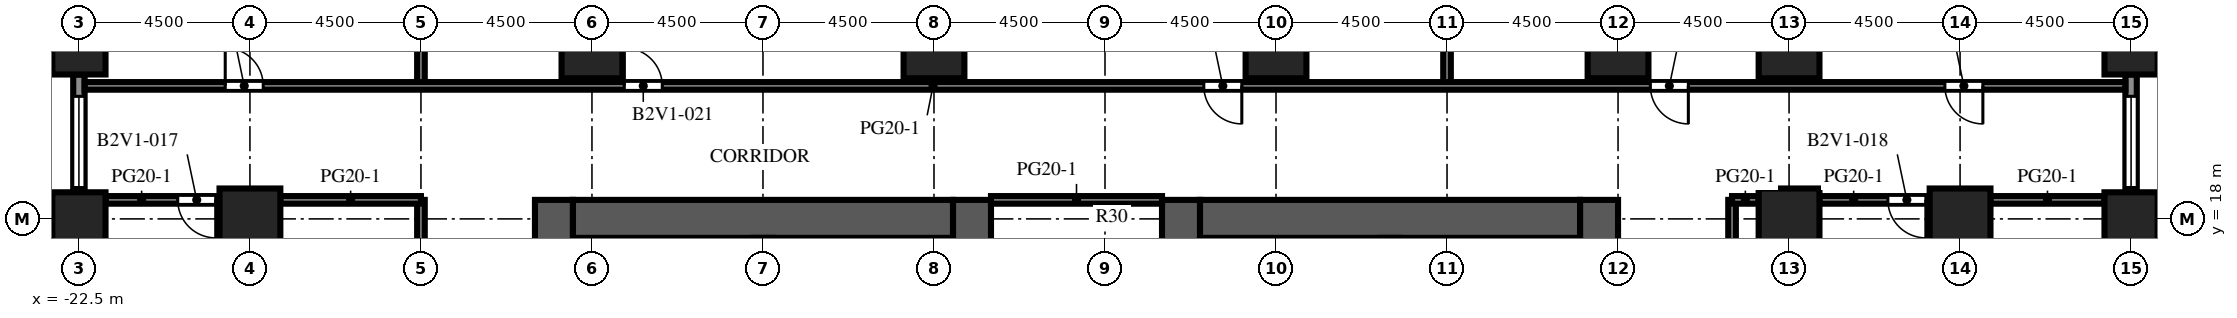
"""IFC4 building model, lengths in metres.
Left out: names, types, materials, properties, quantities, classifications, styles, units other than length and angle.
Written with IfcOpenShell. Run it as: python <this file> out.ifc"""

import sys

from ifc_helpers import new_model, si_unit, direction, frame, frame_2d, origin, origin_2d, place, context, subcontext, project, spatial, rectangle, extrude, element, fill, save


model = new_model("IFC4")
c1 = context("Model", 3, precision=1e-05, world=origin(), true_north=direction((0.0, 1.0)))
c2 = subcontext(c1, "Body", "Model", "MODEL_VIEW")
j1 = project(units=[si_unit("LENGTHUNIT", "METRE"), si_unit("PLANEANGLEUNIT", "RADIAN")], contexts=[c1])
p1 = place(None, origin())
s1 = spatial("IfcSite", under=j1, at=p1, CompositionType="ELEMENT")
p2 = place(p1, origin())
s2 = spatial("IfcBuilding", under=s1, at=p2, CompositionType="ELEMENT")
p3 = place(p2, frame((0.0, 0.0, 50.1)))
s3 = spatial("IfcBuildingStorey", under=s2, at=p3, CompositionType="ELEMENT", Elevation=50.1)
for number, where, z_axis, x_axis in (
    (1, (-22.5, 18.0, 0.0), (0.0, 0.0, 1.0), (1.0, 0.0, 0.0)),
    (2, (-22.5, 22.5, 0.0), (0.0, 0.0, 1.0), (1.0, 0.0, 0.0)),
    (3, (31.5, 18.0, 0.0), (0.0, 0.0, 1.0), (1.0, 0.0, 0.0)),
    (4, (31.5, 22.5, 0.0), (0.0, 0.0, 1.0), (1.0, 0.0, 0.0)),
):
    element("IfcColumn", number, at=place(p3, frame(where, z_axis=z_axis, x_axis=x_axis)), inside=s3, PredefinedType="COLUMN", context=c2, shape_type="SweptSolid", body=[
        extrude(rectangle(XDim=1.4, YDim=1.4, at=origin_2d()), origin(), (0.0, 0.0, 1.0), 4.1),
    ])
for number, where, z_axis, x_axis in (
    (5, (-18.0, 18.0, 0.0), (0.0, 0.0, 1.0), (1.0, 0.0, 0.0)),
    (6, (-9.0, 22.5, 0.0), (0.0, 0.0, 1.0), (1.0, 0.0, 0.0)),
    (7, (0.0, 22.5, 0.0), (0.0, 0.0, 1.0), (1.0, 0.0, 0.0)),
    (8, (9.0, 22.5, 0.0), (0.0, 0.0, 1.0), (1.0, 0.0, 0.0)),
    (9, (18.0, 22.5, 0.0), (0.0, 0.0, 1.0), (1.0, 0.0, 0.0)),
    (10, (22.5, 18.0, 0.0), (0.0, 0.0, 1.0), (1.0, 0.0, 0.0)),
    (11, (22.5, 22.5, 0.0), (0.0, 0.0, 1.0), (1.0, 0.0, 0.0)),
    (12, (27.0, 18.0, 0.0), (0.0, 0.0, 1.0), (1.0, 0.0, 0.0)),
):
    element("IfcColumn", number, at=place(p3, frame(where, z_axis=z_axis, x_axis=x_axis)), inside=s3, PredefinedType="COLUMN", context=c2, shape_type="SweptSolid", body=[
        extrude(rectangle(XDim=1.6, YDim=1.6, at=origin_2d()), origin(), (0.0, 0.0, 1.0), 4.1),
    ])
p4 = place(p3, frame((-10.0, -9.0, 0.0), z_axis=(0.0, 0.0, 1.0), x_axis=(0.0, 1.0, 0.0)))
e13 = element("IfcWall", 13, at=p4, inside=s3, PredefinedType="SHEAR", context=c2, shape_type="SweptSolid", body=[
    extrude(rectangle(XDim=27.5, YDim=1.0, at=frame_2d((13.75, 0.0))), origin(), (0.0, 0.0, 1.0), 4.1),
])
p5 = place(p4, frame((12.55, 0.0, 0.0)))
e14 = element("IfcOpeningElement", 14, at=p5, cuts=e13, PredefinedType="OPENING", context=c2, shape_type="SweptSolid", body=[
    extrude(rectangle(XDim=2.4, YDim=2.4, at=frame_2d((1.2, 1.2))), frame((0.0, 0.51, 0.0), z_axis=(0.0, -1.0, 0.0), x_axis=(1.0, 0.0, 0.0)), (0.0, 0.0, 1.0), 1.02),
])
p6 = place(p4, frame((6.825, 0.0, 0.0)))
e15 = element("IfcOpeningElement", 15, at=p6, cuts=e13, PredefinedType="OPENING", context=c2, shape_type="SweptSolid", body=[
    extrude(rectangle(XDim=1.2, YDim=2.1, at=frame_2d((0.6, 1.05))), frame((0.0, 0.51, 0.0), z_axis=(0.0, -1.0, 0.0), x_axis=(1.0, 0.0, 0.0)), (0.0, 0.0, 1.0), 1.02),
])
p7 = place(p4, frame((19.475, 0.0, 0.0)))
e16 = element("IfcOpeningElement", 16, at=p7, cuts=e13, PredefinedType="OPENING", context=c2, shape_type="SweptSolid", body=[
    extrude(rectangle(XDim=1.2, YDim=2.1, at=frame_2d((0.6, 1.05))), frame((0.0, 0.51, 0.0), z_axis=(0.0, -1.0, 0.0), x_axis=(1.0, 0.0, 0.0)), (0.0, 0.0, 1.0), 1.02),
])
p8 = place(p3, frame((1.0, -9.0, 0.0), z_axis=(0.0, 0.0, 1.0), x_axis=(0.0, 1.0, 0.0)))
e17 = element("IfcWall", 17, at=p8, inside=s3, PredefinedType="SHEAR", context=c2, shape_type="SweptSolid", body=[
    extrude(rectangle(XDim=27.5, YDim=1.0, at=frame_2d((13.75, 0.0))), origin(), (0.0, 0.0, 1.0), 4.1),
])
p9 = place(p8, frame((12.55, 0.0, 0.0)))
e18 = element("IfcOpeningElement", 18, at=p9, cuts=e17, PredefinedType="OPENING", context=c2, shape_type="SweptSolid", body=[
    extrude(rectangle(XDim=2.4, YDim=2.4, at=frame_2d((1.2, 1.2))), frame((0.0, 0.51, 0.0), z_axis=(0.0, -1.0, 0.0), x_axis=(1.0, 0.0, 0.0)), (0.0, 0.0, 1.0), 1.02),
])
p10 = place(p8, frame((4.025, 0.0, 0.0)))
e19 = element("IfcOpeningElement", 19, at=p10, cuts=e17, PredefinedType="OPENING", context=c2, shape_type="SweptSolid", body=[
    extrude(rectangle(XDim=1.2, YDim=2.1, at=frame_2d((0.6, 1.05))), frame((0.0, 0.51, 0.0), z_axis=(0.0, -1.0, 0.0), x_axis=(1.0, 0.0, 0.0)), (0.0, 0.0, 1.0), 1.02),
])
p11 = place(p8, frame((22.275, 0.0, 0.0)))
e20 = element("IfcOpeningElement", 20, at=p11, cuts=e17, PredefinedType="OPENING", context=c2, shape_type="SweptSolid", body=[
    extrude(rectangle(XDim=1.2, YDim=2.1, at=frame_2d((0.6, 1.05))), frame((0.0, 0.51, 0.0), z_axis=(0.0, -1.0, 0.0), x_axis=(1.0, 0.0, 0.0)), (0.0, 0.0, 1.0), 1.02),
])
p12 = place(p3, frame((-9.5, 18.0, 0.0), z_axis=(0.0, 0.0, 1.0), x_axis=(1.0, 0.0, 0.0)))
e21 = element("IfcWall", 21, at=p12, inside=s3, PredefinedType="SHEAR", context=c2, shape_type="SweptSolid", body=[
    extrude(rectangle(XDim=10.0, YDim=1.0, at=frame_2d((5.0, 0.0))), origin(), (0.0, 0.0, 1.0), 4.1),
])
p13 = place(p3, frame((6.5, -9.0, 0.0), z_axis=(0.0, 0.0, 1.0), x_axis=(0.0, 1.0, 0.0)))
e22 = element("IfcWall", 22, at=p13, inside=s3, PredefinedType="SHEAR", context=c2, shape_type="SweptSolid", body=[
    extrude(rectangle(XDim=27.5, YDim=1.0, at=frame_2d((13.75, 0.0))), origin(), (0.0, 0.0, 1.0), 4.1),
])
p14 = place(p13, frame((12.55, 0.0, 0.0)))
e23 = element("IfcOpeningElement", 23, at=p14, cuts=e22, PredefinedType="OPENING", context=c2, shape_type="SweptSolid", body=[
    extrude(rectangle(XDim=2.4, YDim=2.4, at=frame_2d((1.2, 1.2))), frame((0.0, 0.51, 0.0), z_axis=(0.0, -1.0, 0.0), x_axis=(1.0, 0.0, 0.0)), (0.0, 0.0, 1.0), 1.02),
])
p15 = place(p13, frame((4.025, 0.0, 0.0)))
e24 = element("IfcOpeningElement", 24, at=p15, cuts=e22, PredefinedType="OPENING", context=c2, shape_type="SweptSolid", body=[
    extrude(rectangle(XDim=1.2, YDim=2.1, at=frame_2d((0.6, 1.05))), frame((0.0, 0.51, 0.0), z_axis=(0.0, -1.0, 0.0), x_axis=(1.0, 0.0, 0.0)), (0.0, 0.0, 1.0), 1.02),
])
p16 = place(p13, frame((22.275, 0.0, 0.0)))
e25 = element("IfcOpeningElement", 25, at=p16, cuts=e22, PredefinedType="OPENING", context=c2, shape_type="SweptSolid", body=[
    extrude(rectangle(XDim=1.2, YDim=2.1, at=frame_2d((0.6, 1.05))), frame((0.0, 0.51, 0.0), z_axis=(0.0, -1.0, 0.0), x_axis=(1.0, 0.0, 0.0)), (0.0, 0.0, 1.0), 1.02),
])
p17 = place(p3, frame((17.5, -9.0, 0.0), z_axis=(0.0, 0.0, 1.0), x_axis=(0.0, 1.0, 0.0)))
e26 = element("IfcWall", 26, at=p17, inside=s3, PredefinedType="SHEAR", context=c2, shape_type="SweptSolid", body=[
    extrude(rectangle(XDim=27.5, YDim=1.0, at=frame_2d((13.75, 0.0))), origin(), (0.0, 0.0, 1.0), 4.1),
])
p18 = place(p17, frame((12.55, 0.0, 0.0)))
e27 = element("IfcOpeningElement", 27, at=p18, cuts=e26, PredefinedType="OPENING", context=c2, shape_type="SweptSolid", body=[
    extrude(rectangle(XDim=2.4, YDim=2.4, at=frame_2d((1.2, 1.2))), frame((0.0, 0.51, 0.0), z_axis=(0.0, -1.0, 0.0), x_axis=(1.0, 0.0, 0.0)), (0.0, 0.0, 1.0), 1.02),
])
p19 = place(p17, frame((6.825, 0.0, 0.0)))
e28 = element("IfcOpeningElement", 28, at=p19, cuts=e26, PredefinedType="OPENING", context=c2, shape_type="SweptSolid", body=[
    extrude(rectangle(XDim=1.2, YDim=2.1, at=frame_2d((0.6, 1.05))), frame((0.0, 0.51, 0.0), z_axis=(0.0, -1.0, 0.0), x_axis=(1.0, 0.0, 0.0)), (0.0, 0.0, 1.0), 1.02),
])
p20 = place(p17, frame((19.475, 0.0, 0.0)))
e29 = element("IfcOpeningElement", 29, at=p20, cuts=e26, PredefinedType="OPENING", context=c2, shape_type="SweptSolid", body=[
    extrude(rectangle(XDim=1.2, YDim=2.1, at=frame_2d((0.6, 1.05))), frame((0.0, 0.51, 0.0), z_axis=(0.0, -1.0, 0.0), x_axis=(1.0, 0.0, 0.0)), (0.0, 0.0, 1.0), 1.02),
])
p21 = place(p3, frame((7.0, 18.0, 0.0), z_axis=(0.0, 0.0, 1.0), x_axis=(1.0, 0.0, 0.0)))
e30 = element("IfcWall", 30, at=p21, inside=s3, PredefinedType="SHEAR", context=c2, shape_type="SweptSolid", body=[
    extrude(rectangle(XDim=10.0, YDim=1.0, at=frame_2d((5.0, 0.0))), origin(), (0.0, 0.0, 1.0), 4.1),
])
p22 = place(p3, frame((31.5, 21.8, 0.0), z_axis=(0.0, 0.0, 1.0), x_axis=(0.0, -1.0, 0.0)))
e31 = element("IfcWall", 31, at=p22, inside=s3, PredefinedType="SOLIDWALL", context=c2, shape_type="SweptSolid", body=[
    extrude(rectangle(XDim=3.1, YDim=0.3, at=frame_2d((1.55, 0.0))), origin(), (0.0, 0.0, 1.0), 2.75),
])
p23 = place(p22, frame((0.575, 0.0, 0.8)))
e32 = element("IfcOpeningElement", 32, at=p23, cuts=e31, PredefinedType="OPENING", context=c2, shape_type="SweptSolid", body=[
    extrude(rectangle(XDim=2.4, YDim=1.7, at=frame_2d((1.2, 0.85))), frame((0.0, 0.16, 0.0), z_axis=(0.0, -1.0, 0.0), x_axis=(1.0, 0.0, 0.0)), (0.0, 0.0, 1.0), 0.32),
])
p24 = place(p3, frame((-22.5, 18.7, 0.0), z_axis=(0.0, 0.0, 1.0), x_axis=(0.0, 1.0, 0.0)))
e33 = element("IfcWall", 33, at=p24, inside=s3, PredefinedType="SOLIDWALL", context=c2, shape_type="SweptSolid", body=[
    extrude(rectangle(XDim=3.1, YDim=0.3, at=frame_2d((1.55, 0.0))), origin(), (0.0, 0.0, 1.0), 2.75),
])
p25 = place(p24, frame((0.125, 0.0, 0.8)))
e34 = element("IfcOpeningElement", 34, at=p25, cuts=e33, PredefinedType="OPENING", context=c2, shape_type="SweptSolid", body=[
    extrude(rectangle(XDim=2.4, YDim=1.7, at=frame_2d((1.2, 0.85))), frame((0.0, 0.16, 0.0), z_axis=(0.0, -1.0, 0.0), x_axis=(1.0, 0.0, 0.0)), (0.0, 0.0, 1.0), 0.32),
])
p26 = place(p3, frame((-13.5, -9.0, 0.0), z_axis=(0.0, 0.0, 1.0), x_axis=(0.0, 1.0, 0.0)))
e35 = element("IfcWall", 35, at=p26, inside=s3, PredefinedType="PARTITIONING", context=c2, shape_type="SweptSolid", body=[
    extrude(rectangle(XDim=27.5, YDim=0.2, at=frame_2d((13.75, 0.0))), origin(), (0.0, 0.0, 1.0), 3.65),
])
p27 = place(p26, frame((5.1, 0.0, 0.0)))
e36 = element("IfcOpeningElement", 36, at=p27, cuts=e35, PredefinedType="OPENING", context=c2, shape_type="SweptSolid", body=[
    extrude(rectangle(XDim=1.0, YDim=2.1, at=frame_2d((0.5, 1.05))), frame((0.0, 0.11, 0.0), z_axis=(0.0, -1.0, 0.0), x_axis=(1.0, 0.0, 0.0)), (0.0, 0.0, 1.0), 0.22),
])
p28 = place(p26, frame((15.6, 0.0, 0.0)))
e37 = element("IfcOpeningElement", 37, at=p28, cuts=e35, PredefinedType="OPENING", context=c2, shape_type="SweptSolid", body=[
    extrude(rectangle(XDim=1.0, YDim=2.1, at=frame_2d((0.5, 1.05))), frame((0.0, 0.11, 0.0), z_axis=(0.0, -1.0, 0.0), x_axis=(1.0, 0.0, 0.0)), (0.0, 0.0, 1.0), 0.22),
])
for number, where, z_axis, x_axis in (
    (38, (-13.5, 21.5, 0.0), (0.0, 0.0, 1.0), (0.0, 1.0, 0.0)),
    (39, (13.5, 21.5, 0.0), (0.0, 0.0, 1.0), (0.0, 1.0, 0.0)),
):
    element("IfcWall", number, at=place(p3, frame(where, z_axis=z_axis, x_axis=x_axis)), inside=s3, PredefinedType="PARTITIONING", context=c2, shape_type="SweptSolid", body=[
        extrude(rectangle(XDim=4.8, YDim=0.2, at=frame_2d((2.4, 0.0))), origin(), (0.0, 0.0, 1.0), 3.65),
    ])
p29 = place(p3, frame((21.0, 18.5, 0.0), z_axis=(0.0, 0.0, 1.0), x_axis=(0.0, -1.0, 0.0)))
e40 = element("IfcWall", 40, at=p29, inside=s3, PredefinedType="PARTITIONING", context=c2, shape_type="SweptSolid", body=[
    extrude(rectangle(XDim=27.5, YDim=0.2, at=frame_2d((13.75, 0.0))), origin(), (0.0, 0.0, 1.0), 3.65),
])
p30 = place(p29, frame((10.9, 0.0, 0.0)))
e41 = element("IfcOpeningElement", 41, at=p30, cuts=e40, PredefinedType="OPENING", context=c2, shape_type="SweptSolid", body=[
    extrude(rectangle(XDim=1.0, YDim=2.1, at=frame_2d((0.5, 1.05))), frame((0.0, 0.11, 0.0), z_axis=(0.0, -1.0, 0.0), x_axis=(1.0, 0.0, 0.0)), (0.0, 0.0, 1.0), 0.22),
])
p31 = place(p3, frame((-18.8, 18.5, 0.0), z_axis=(0.0, 0.0, 1.0), x_axis=(-1.0, 0.0, 0.0)))
e42 = element("IfcWall", 42, at=p31, inside=s3, PredefinedType="PARTITIONING", context=c2, shape_type="SweptSolid", body=[
    extrude(rectangle(XDim=3.0, YDim=0.2, at=frame_2d((1.5, 0.0))), origin(), (0.0, 0.0, 1.0), 3.65),
])
p32 = place(p31, frame((0.1, 0.0, 0.0)))
e43 = element("IfcOpeningElement", 43, at=p32, cuts=e42, PredefinedType="OPENING", context=c2, shape_type="SweptSolid", body=[
    extrude(rectangle(XDim=1.0, YDim=2.1, at=frame_2d((0.5, 1.05))), frame((0.0, 0.11, 0.0), z_axis=(0.0, -1.0, 0.0), x_axis=(1.0, 0.0, 0.0)), (0.0, 0.0, 1.0), 0.22),
])
p33 = place(p3, frame((-17.2, 18.5, 0.0), z_axis=(0.0, 0.0, 1.0), x_axis=(1.0, 0.0, 0.0)))
e44 = element("IfcWall", 44, at=p33, inside=s3, PredefinedType="PARTITIONING", context=c2, shape_type="SweptSolid", body=[
    extrude(rectangle(XDim=3.7, YDim=0.2, at=frame_2d((1.85, 0.0))), origin(), (0.0, 0.0, 1.0), 3.65),
])
p34 = place(p3, frame((1.5, 18.5, 0.0), z_axis=(0.0, 0.0, 1.0), x_axis=(1.0, 0.0, 0.0)))
e45 = element("IfcWall", 45, at=p34, inside=s3, PredefinedType="PARTITIONING", context=c2, shape_type="SweptSolid", body=[
    extrude(rectangle(XDim=4.5, YDim=0.2, at=frame_2d((2.25, 0.0))), origin(), (0.0, 0.0, 1.0), 3.65),
])
p35 = place(p3, frame((21.0, 18.5, 0.0), z_axis=(0.0, 0.0, 1.0), x_axis=(1.0, 0.0, 0.0)))
e46 = element("IfcWall", 46, at=p35, inside=s3, PredefinedType="PARTITIONING", context=c2, shape_type="SweptSolid", body=[
    extrude(rectangle(XDim=0.7, YDim=0.2, at=frame_2d((0.35, 0.0))), origin(), (0.0, 0.0, 1.0), 3.65),
])
p36 = place(p3, frame((26.2, 18.5, 0.0), z_axis=(0.0, 0.0, 1.0), x_axis=(-1.0, 0.0, 0.0)))
e47 = element("IfcWall", 47, at=p36, inside=s3, PredefinedType="PARTITIONING", context=c2, shape_type="SweptSolid", body=[
    extrude(rectangle(XDim=2.9, YDim=0.2, at=frame_2d((1.45, 0.0))), origin(), (0.0, 0.0, 1.0), 3.65),
])
p37 = place(p36, frame((0.1, 0.0, 0.0)))
e48 = element("IfcOpeningElement", 48, at=p37, cuts=e47, PredefinedType="OPENING", context=c2, shape_type="SweptSolid", body=[
    extrude(rectangle(XDim=1.0, YDim=2.1, at=frame_2d((0.5, 1.05))), frame((0.0, 0.11, 0.0), z_axis=(0.0, -1.0, 0.0), x_axis=(1.0, 0.0, 0.0)), (0.0, 0.0, 1.0), 0.22),
])
p38 = place(p3, frame((27.8, 18.5, 0.0), z_axis=(0.0, 0.0, 1.0), x_axis=(1.0, 0.0, 0.0)))
e49 = element("IfcWall", 49, at=p38, inside=s3, PredefinedType="PARTITIONING", context=c2, shape_type="SweptSolid", body=[
    extrude(rectangle(XDim=3.0, YDim=0.2, at=frame_2d((1.5, 0.0))), origin(), (0.0, 0.0, 1.0), 3.65),
])
p39 = place(p3, frame((-22.35, 21.5, 0.0), z_axis=(0.0, 0.0, 1.0), x_axis=(1.0, 0.0, 0.0)))
e50 = element("IfcWall", 50, at=p39, inside=s3, PredefinedType="PARTITIONING", context=c2, shape_type="SweptSolid", body=[
    extrude(rectangle(XDim=53.7, YDim=0.2, at=frame_2d((26.85, 0.0))), origin(), (0.0, 0.0, 1.0), 3.65),
])
p40 = place(p39, frame((3.7, 0.0, 0.0)))
e51 = element("IfcOpeningElement", 51, at=p40, cuts=e50, PredefinedType="OPENING", context=c2, shape_type="SweptSolid", body=[
    extrude(rectangle(XDim=1.0, YDim=2.1, at=frame_2d((0.5, 1.05))), frame((0.0, 0.11, 0.0), z_axis=(0.0, -1.0, 0.0), x_axis=(1.0, 0.0, 0.0)), (0.0, 0.0, 1.0), 0.22),
])
p41 = place(p39, frame((14.2, 0.0, 0.0)))
e52 = element("IfcOpeningElement", 52, at=p41, cuts=e50, PredefinedType="OPENING", context=c2, shape_type="SweptSolid", body=[
    extrude(rectangle(XDim=1.0, YDim=2.1, at=frame_2d((0.5, 1.05))), frame((0.0, 0.11, 0.0), z_axis=(0.0, -1.0, 0.0), x_axis=(1.0, 0.0, 0.0)), (0.0, 0.0, 1.0), 0.22),
])
p42 = place(p39, frame((29.45, 0.0, 0.0)))
e53 = element("IfcOpeningElement", 53, at=p42, cuts=e50, PredefinedType="OPENING", context=c2, shape_type="SweptSolid", body=[
    extrude(rectangle(XDim=1.0, YDim=2.1, at=frame_2d((0.5, 1.05))), frame((0.0, 0.11, 0.0), z_axis=(0.0, -1.0, 0.0), x_axis=(1.0, 0.0, 0.0)), (0.0, 0.0, 1.0), 0.22),
])
p43 = place(p39, frame((41.2, 0.0, 0.0)))
e54 = element("IfcOpeningElement", 54, at=p43, cuts=e50, PredefinedType="OPENING", context=c2, shape_type="SweptSolid", body=[
    extrude(rectangle(XDim=1.0, YDim=2.1, at=frame_2d((0.5, 1.05))), frame((0.0, 0.11, 0.0), z_axis=(0.0, -1.0, 0.0), x_axis=(1.0, 0.0, 0.0)), (0.0, 0.0, 1.0), 0.22),
])
p44 = place(p39, frame((48.95, 0.0, 0.0)))
e55 = element("IfcOpeningElement", 55, at=p44, cuts=e50, PredefinedType="OPENING", context=c2, shape_type="SweptSolid", body=[
    extrude(rectangle(XDim=1.0, YDim=2.1, at=frame_2d((0.5, 1.05))), frame((0.0, 0.11, 0.0), z_axis=(0.0, -1.0, 0.0), x_axis=(1.0, 0.0, 0.0)), (0.0, 0.0, 1.0), 0.22),
])
p45 = place(p23, origin())
e56 = element("IfcWindow", 56, at=p45, inside=s3, PartitioningType="SINGLE_PANEL", PredefinedType="WINDOW", context=c2, shape_type="SweptSolid", body=[
    extrude(rectangle(XDim=2.4, YDim=1.7, at=frame_2d((1.2, 0.85))), frame((0.0, 0.03, 0.0), z_axis=(0.0, -1.0, 0.0), x_axis=(1.0, 0.0, 0.0)), (0.0, 0.0, 1.0), 0.06),
])
fill(e32, e56)
p46 = place(p25, origin())
e57 = element("IfcWindow", 57, at=p46, inside=s3, PartitioningType="SINGLE_PANEL", PredefinedType="WINDOW", context=c2, shape_type="SweptSolid", body=[
    extrude(rectangle(XDim=2.4, YDim=1.7, at=frame_2d((1.2, 0.85))), frame((0.0, 0.03, 0.0), z_axis=(0.0, -1.0, 0.0), x_axis=(1.0, 0.0, 0.0)), (0.0, 0.0, 1.0), 0.06),
])
fill(e34, e57)
p47 = place(p32, origin())
e58 = element("IfcDoor", 58, at=p47, inside=s3, OperationType="SINGLE_SWING_LEFT", PredefinedType="DOOR", context=c2, shape_type="SweptSolid", body=[
    extrude(rectangle(XDim=1.0, YDim=2.1, at=frame_2d((0.5, 1.05))), frame((0.0, 0.025, 0.0), z_axis=(0.0, -1.0, 0.0), x_axis=(1.0, 0.0, 0.0)), (0.0, 0.0, 1.0), 0.05),
])
fill(e43, e58)
p48 = place(p37, origin())
e59 = element("IfcDoor", 59, at=p48, inside=s3, OperationType="SINGLE_SWING_LEFT", PredefinedType="DOOR", context=c2, shape_type="SweptSolid", body=[
    extrude(rectangle(XDim=1.0, YDim=2.1, at=frame_2d((0.5, 1.05))), frame((0.0, 0.025, 0.0), z_axis=(0.0, -1.0, 0.0), x_axis=(1.0, 0.0, 0.0)), (0.0, 0.0, 1.0), 0.05),
])
fill(e48, e59)
p49 = place(p40, origin())
e60 = element("IfcDoor", 60, at=p49, inside=s3, OperationType="SINGLE_SWING_LEFT", PredefinedType="DOOR", context=c2, shape_type="SweptSolid", body=[
    extrude(rectangle(XDim=1.0, YDim=2.1, at=frame_2d((0.5, 1.05))), frame((0.0, 0.025, 0.0), z_axis=(0.0, -1.0, 0.0), x_axis=(1.0, 0.0, 0.0)), (0.0, 0.0, 1.0), 0.05),
])
fill(e51, e60)
p50 = place(p41, origin())
e61 = element("IfcDoor", 61, at=p50, inside=s3, OperationType="SINGLE_SWING_LEFT", PredefinedType="DOOR", context=c2, shape_type="SweptSolid", body=[
    extrude(rectangle(XDim=1.0, YDim=2.1, at=frame_2d((0.5, 1.05))), frame((0.0, 0.025, 0.0), z_axis=(0.0, -1.0, 0.0), x_axis=(1.0, 0.0, 0.0)), (0.0, 0.0, 1.0), 0.05),
])
fill(e52, e61)
p51 = place(p42, origin())
e62 = element("IfcDoor", 62, at=p51, inside=s3, OperationType="SINGLE_SWING_RIGHT", PredefinedType="DOOR", context=c2, shape_type="SweptSolid", body=[
    extrude(rectangle(XDim=1.0, YDim=2.1, at=frame_2d((0.5, 1.05))), frame((0.0, 0.025, 0.0), z_axis=(0.0, -1.0, 0.0), x_axis=(1.0, 0.0, 0.0)), (0.0, 0.0, 1.0), 0.05),
])
fill(e53, e62)
p52 = place(p43, origin())
e63 = element("IfcDoor", 63, at=p52, inside=s3, OperationType="SINGLE_SWING_RIGHT", PredefinedType="DOOR", context=c2, shape_type="SweptSolid", body=[
    extrude(rectangle(XDim=1.0, YDim=2.1, at=frame_2d((0.5, 1.05))), frame((0.0, 0.025, 0.0), z_axis=(0.0, -1.0, 0.0), x_axis=(1.0, 0.0, 0.0)), (0.0, 0.0, 1.0), 0.05),
])
fill(e54, e63)
p53 = place(p44, origin())
e64 = element("IfcDoor", 64, at=p53, inside=s3, OperationType="SINGLE_SWING_RIGHT", PredefinedType="DOOR", context=c2, shape_type="SweptSolid", body=[
    extrude(rectangle(XDim=1.0, YDim=2.1, at=frame_2d((0.5, 1.05))), frame((0.0, 0.025, 0.0), z_axis=(0.0, -1.0, 0.0), x_axis=(1.0, 0.0, 0.0)), (0.0, 0.0, 1.0), 0.05),
])
fill(e55, e64)
save(model, sys.argv[1])
